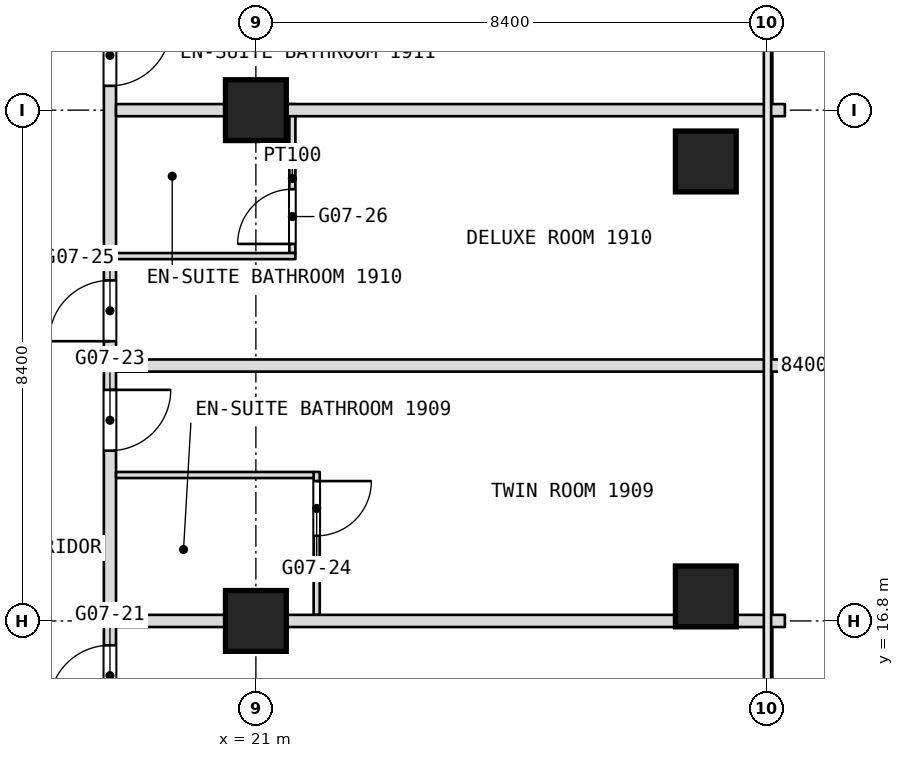
"""IFC4 building model, lengths in metres.
Left out: names, types, materials, properties, quantities, classifications, styles, units other than length and angle.
Written with IfcOpenShell. Run it as: python <this file> out.ifc"""

import sys

from ifc_helpers import new_model, si_unit, direction, frame, frame_2d, origin, origin_2d, place, context, subcontext, project, spatial, rectangle, extrude, element, fill, save


model = new_model("IFC4")
c1 = context("Model", 3, precision=1e-05, world=origin(), true_north=direction((0.0, 1.0)))
c2 = subcontext(c1, "Body", "Model", "MODEL_VIEW")
j1 = project(units=[si_unit("LENGTHUNIT", "METRE"), si_unit("PLANEANGLEUNIT", "RADIAN")], contexts=[c1])
p1 = place(None, origin())
s1 = spatial("IfcSite", under=j1, at=p1, CompositionType="ELEMENT")
p2 = place(p1, origin())
s2 = spatial("IfcBuilding", under=s1, at=p2, CompositionType="ELEMENT")
p3 = place(p2, frame((0.0, 0.0, 83.3)))
s3 = spatial("IfcBuildingStorey", under=s2, at=p3, CompositionType="ELEMENT", Elevation=83.3)
for number, where, z_axis, x_axis in (
    (1, (21.0, 16.8, 0.0), (0.0, 0.0, 1.0), (1.0, 0.0, 0.0)),
    (2, (21.0, 25.2, 0.0), (0.0, 0.0, 1.0), (1.0, 0.0, 0.0)),
    (3, (28.4, 24.356, 0.0), (0.0, 0.0, 1.0), (1.0, 0.0, 0.0)),
    (4, (28.4, 17.203, 0.0), (0.0, 0.0, 1.0), (1.0, 0.0, 0.0)),
):
    element("IfcColumn", number, at=place(p3, frame(where, z_axis=z_axis, x_axis=x_axis)), inside=s3, PredefinedType="COLUMN", context=c2, shape_type="SweptSolid", body=[
        extrude(rectangle(XDim=1.0, YDim=1.0, at=origin_2d()), origin(), (0.0, 0.0, 1.0), 3.6),
    ])
p4 = place(p3, frame((22.0, 16.9, 0.0), z_axis=(0.0, 0.0, 1.0), x_axis=(0.0, 1.0, 0.0)))
e5 = element("IfcWall", 5, at=p4, inside=s3, PredefinedType="PARTITIONING", context=c2, shape_type="SweptSolid", body=[
    extrude(rectangle(XDim=2.35, YDim=0.1, at=frame_2d((1.175, 0.0))), origin(), (0.0, 0.0, 1.0), 3.3),
])
p5 = place(p4, frame((1.3, 0.0, 0.0)))
e6 = element("IfcOpeningElement", 6, at=p5, cuts=e5, PredefinedType="OPENING", context=c2, shape_type="SweptSolid", body=[
    extrude(rectangle(XDim=0.9, YDim=2.1, at=frame_2d((0.45, 1.05))), frame((0.0, 0.05, 0.0), z_axis=(0.0, -1.0, 0.0), x_axis=(1.0, 0.0, 0.0)), (0.0, 0.0, 1.0), 0.1),
])
p6 = place(p3, frame((21.6, 22.85, 0.0), z_axis=(0.0, 0.0, 1.0), x_axis=(0.0, 1.0, 0.0)))
e7 = element("IfcWall", 7, at=p6, inside=s3, PredefinedType="PARTITIONING", context=c2, shape_type="SweptSolid", body=[
    extrude(rectangle(XDim=2.45, YDim=0.1, at=frame_2d((1.225, 0.0))), origin(), (0.0, 0.0, 1.0), 3.3),
])
p7 = place(p6, frame((0.15, 0.0, 0.0)))
e8 = element("IfcOpeningElement", 8, at=p7, cuts=e7, PredefinedType="OPENING", context=c2, shape_type="SweptSolid", body=[
    extrude(rectangle(XDim=0.9, YDim=2.1, at=frame_2d((0.45, 1.05))), frame((0.0, 0.05, 0.0), z_axis=(0.0, -1.0, 0.0), x_axis=(1.0, 0.0, 0.0)), (0.0, 0.0, 1.0), 0.1),
])
p8 = place(p3, frame((18.6, -16.665, 0.0), z_axis=(0.0, 0.0, 1.0), x_axis=(0.0, 1.0, 0.0)))
e9 = element("IfcWall", 9, at=p8, inside=s3, PredefinedType="PARTITIONING", context=c2, shape_type="SweptSolid", body=[
    extrude(rectangle(XDim=50.205, YDim=0.2, at=frame_2d((25.103, 0.0))), origin(), (0.0, 0.0, 1.0), 3.3),
])
p9 = place(p8, frame((2.991, 0.0, 0.0)))
e10 = element("IfcOpeningElement", 10, at=p9, cuts=e9, PredefinedType="OPENING", context=c2, shape_type="SweptSolid", body=[
    extrude(rectangle(XDim=1.0, YDim=2.1, at=frame_2d((0.5, 1.05))), frame((0.0, 0.1, 0.0), z_axis=(0.0, -1.0, 0.0), x_axis=(1.0, 0.0, 0.0)), (0.0, 0.0, 1.0), 0.2),
])
p10 = place(p8, frame((4.574, 0.0, 0.0)))
e11 = element("IfcOpeningElement", 11, at=p10, cuts=e9, PredefinedType="OPENING", context=c2, shape_type="SweptSolid", body=[
    extrude(rectangle(XDim=1.0, YDim=2.1, at=frame_2d((0.5, 1.05))), frame((0.0, 0.1, 0.0), z_axis=(0.0, -1.0, 0.0), x_axis=(1.0, 0.0, 0.0)), (0.0, 0.0, 1.0), 0.2),
])
p11 = place(p8, frame((8.665, 0.0, 0.0)))
e12 = element("IfcOpeningElement", 12, at=p11, cuts=e9, PredefinedType="OPENING", context=c2, shape_type="SweptSolid", body=[
    extrude(rectangle(XDim=1.0, YDim=2.1, at=frame_2d((0.5, 1.05))), frame((0.0, 0.1, 0.0), z_axis=(0.0, -1.0, 0.0), x_axis=(1.0, 0.0, 0.0)), (0.0, 0.0, 1.0), 0.2),
])
p12 = place(p8, frame((15.265, 0.0, 0.0)))
e13 = element("IfcOpeningElement", 13, at=p12, cuts=e9, PredefinedType="OPENING", context=c2, shape_type="SweptSolid", body=[
    extrude(rectangle(XDim=1.0, YDim=2.1, at=frame_2d((0.5, 1.05))), frame((0.0, 0.1, 0.0), z_axis=(0.0, -1.0, 0.0), x_axis=(1.0, 0.0, 0.0)), (0.0, 0.0, 1.0), 0.2),
])
p13 = place(p8, frame((19.465, 0.0, 0.0)))
e14 = element("IfcOpeningElement", 14, at=p13, cuts=e9, PredefinedType="OPENING", context=c2, shape_type="SweptSolid", body=[
    extrude(rectangle(XDim=1.0, YDim=2.1, at=frame_2d((0.5, 1.05))), frame((0.0, 0.1, 0.0), z_axis=(0.0, -1.0, 0.0), x_axis=(1.0, 0.0, 0.0)), (0.0, 0.0, 1.0), 0.2),
])
p14 = place(p8, frame((21.265, 0.0, 0.0)))
e15 = element("IfcOpeningElement", 15, at=p14, cuts=e9, PredefinedType="OPENING", context=c2, shape_type="SweptSolid", body=[
    extrude(rectangle(XDim=1.0, YDim=2.1, at=frame_2d((0.5, 1.05))), frame((0.0, 0.1, 0.0), z_axis=(0.0, -1.0, 0.0), x_axis=(1.0, 0.0, 0.0)), (0.0, 0.0, 1.0), 0.2),
])
p15 = place(p8, frame((25.465, 0.0, 0.0)))
e16 = element("IfcOpeningElement", 16, at=p15, cuts=e9, PredefinedType="OPENING", context=c2, shape_type="SweptSolid", body=[
    extrude(rectangle(XDim=1.0, YDim=2.1, at=frame_2d((0.5, 1.05))), frame((0.0, 0.1, 0.0), z_axis=(0.0, -1.0, 0.0), x_axis=(1.0, 0.0, 0.0)), (0.0, 0.0, 1.0), 0.2),
])
p16 = place(p8, frame((32.065, 0.0, 0.0)))
e17 = element("IfcOpeningElement", 17, at=p16, cuts=e9, PredefinedType="OPENING", context=c2, shape_type="SweptSolid", body=[
    extrude(rectangle(XDim=1.0, YDim=2.1, at=frame_2d((0.5, 1.05))), frame((0.0, 0.1, 0.0), z_axis=(0.0, -1.0, 0.0), x_axis=(1.0, 0.0, 0.0)), (0.0, 0.0, 1.0), 0.2),
])
p17 = place(p8, frame((36.265, 0.0, 0.0)))
e18 = element("IfcOpeningElement", 18, at=p17, cuts=e9, PredefinedType="OPENING", context=c2, shape_type="SweptSolid", body=[
    extrude(rectangle(XDim=1.0, YDim=2.1, at=frame_2d((0.5, 1.05))), frame((0.0, 0.1, 0.0), z_axis=(0.0, -1.0, 0.0), x_axis=(1.0, 0.0, 0.0)), (0.0, 0.0, 1.0), 0.2),
])
p18 = place(p8, frame((38.065, 0.0, 0.0)))
e19 = element("IfcOpeningElement", 19, at=p18, cuts=e9, PredefinedType="OPENING", context=c2, shape_type="SweptSolid", body=[
    extrude(rectangle(XDim=1.0, YDim=2.1, at=frame_2d((0.5, 1.05))), frame((0.0, 0.1, 0.0), z_axis=(0.0, -1.0, 0.0), x_axis=(1.0, 0.0, 0.0)), (0.0, 0.0, 1.0), 0.2),
])
p19 = place(p8, frame((42.265, 0.0, 0.0)))
e20 = element("IfcOpeningElement", 20, at=p19, cuts=e9, PredefinedType="OPENING", context=c2, shape_type="SweptSolid", body=[
    extrude(rectangle(XDim=1.0, YDim=2.1, at=frame_2d((0.5, 1.05))), frame((0.0, 0.1, 0.0), z_axis=(0.0, -1.0, 0.0), x_axis=(1.0, 0.0, 0.0)), (0.0, 0.0, 1.0), 0.2),
])
p20 = place(p8, frame((46.365, 0.0, 0.0)))
e21 = element("IfcOpeningElement", 21, at=p20, cuts=e9, PredefinedType="OPENING", context=c2, shape_type="SweptSolid", body=[
    extrude(rectangle(XDim=1.0, YDim=2.1, at=frame_2d((0.5, 1.05))), frame((0.0, 0.1, 0.0), z_axis=(0.0, -1.0, 0.0), x_axis=(1.0, 0.0, 0.0)), (0.0, 0.0, 1.0), 0.2),
])
p21 = place(p3, frame((18.7, 16.8, 0.0), z_axis=(0.0, 0.0, 1.0), x_axis=(1.0, 0.0, 0.0)))
e22 = element("IfcWall", 22, at=p21, inside=s3, PredefinedType="PARTITIONING", context=c2, shape_type="SweptSolid", body=[
    extrude(rectangle(XDim=11.0, YDim=0.2, at=frame_2d((5.5, 0.0))), origin(), (0.0, 0.0, 1.0), 2.8),
])
p22 = place(p3, frame((18.7, 19.2, 0.0), z_axis=(0.0, 0.0, 1.0), x_axis=(1.0, 0.0, 0.0)))
e23 = element("IfcWall", 23, at=p22, inside=s3, PredefinedType="PARTITIONING", context=c2, shape_type="SweptSolid", body=[
    extrude(rectangle(XDim=3.25, YDim=0.1, at=frame_2d((1.625, 0.0))), origin(), (0.0, 0.0, 1.0), 3.3),
])
p23 = place(p3, frame((18.7, 21.0, 0.0), z_axis=(0.0, 0.0, 1.0), x_axis=(1.0, 0.0, 0.0)))
e24 = element("IfcWall", 24, at=p23, inside=s3, PredefinedType="PARTITIONING", context=c2, shape_type="SweptSolid", body=[
    extrude(rectangle(XDim=11.0, YDim=0.2, at=frame_2d((5.5, 0.0))), origin(), (0.0, 0.0, 1.0), 3.3),
])
p24 = place(p3, frame((18.7, 22.8, 0.0), z_axis=(0.0, 0.0, 1.0), x_axis=(1.0, 0.0, 0.0)))
e25 = element("IfcWall", 25, at=p24, inside=s3, PredefinedType="PARTITIONING", context=c2, shape_type="SweptSolid", body=[
    extrude(rectangle(XDim=2.95, YDim=0.1, at=frame_2d((1.475, 0.0))), origin(), (0.0, 0.0, 1.0), 3.3),
])
p25 = place(p3, frame((18.7, 25.2, 0.0), z_axis=(0.0, 0.0, 1.0), x_axis=(1.0, 0.0, 0.0)))
e26 = element("IfcWall", 26, at=p25, inside=s3, PredefinedType="PARTITIONING", context=c2, shape_type="SweptSolid", body=[
    extrude(rectangle(XDim=11.0, YDim=0.2, at=frame_2d((5.5, 0.0))), origin(), (0.0, 0.0, 1.0), 2.8),
])
p26 = place(p5, origin())
e27 = element("IfcDoor", 27, at=p26, inside=s3, OperationType="SINGLE_SWING_RIGHT", PredefinedType="DOOR", context=c2, shape_type="SweptSolid", body=[
    extrude(rectangle(XDim=0.9, YDim=2.1, at=frame_2d((0.45, 1.05))), frame((0.0, 0.025, 0.0), z_axis=(0.0, -1.0, 0.0), x_axis=(1.0, 0.0, 0.0)), (0.0, 0.0, 1.0), 0.05),
])
fill(e6, e27)
p27 = place(p7, origin())
e28 = element("IfcDoor", 28, at=p27, inside=s3, OperationType="SINGLE_SWING_LEFT", PredefinedType="DOOR", context=c2, shape_type="SweptSolid", body=[
    extrude(rectangle(XDim=0.9, YDim=2.1, at=frame_2d((0.45, 1.05))), frame((0.0, 0.025, 0.0), z_axis=(0.0, -1.0, 0.0), x_axis=(1.0, 0.0, 0.0)), (0.0, 0.0, 1.0), 0.05),
])
fill(e8, e28)
p28 = place(p16, origin())
e29 = element("IfcDoor", 29, at=p28, inside=s3, OperationType="SINGLE_SWING_LEFT", PredefinedType="DOOR", context=c2, shape_type="SweptSolid", body=[
    extrude(rectangle(XDim=1.0, YDim=2.1, at=frame_2d((0.5, 1.05))), frame((0.0, 0.025, 0.0), z_axis=(0.0, -1.0, 0.0), x_axis=(1.0, 0.0, 0.0)), (0.0, 0.0, 1.0), 0.05),
])
fill(e17, e29)
p29 = place(p17, origin())
e30 = element("IfcDoor", 30, at=p29, inside=s3, OperationType="SINGLE_SWING_LEFT", PredefinedType="DOOR", context=c2, shape_type="SweptSolid", body=[
    extrude(rectangle(XDim=1.0, YDim=2.1, at=frame_2d((0.5, 1.05))), frame((0.0, 0.025, 0.0), z_axis=(0.0, -1.0, 0.0), x_axis=(1.0, 0.0, 0.0)), (0.0, 0.0, 1.0), 0.05),
])
fill(e18, e30)
p30 = place(p18, origin())
e31 = element("IfcDoor", 31, at=p30, inside=s3, OperationType="SINGLE_SWING_LEFT", PredefinedType="DOOR", context=c2, shape_type="SweptSolid", body=[
    extrude(rectangle(XDim=1.0, YDim=2.1, at=frame_2d((0.5, 1.05))), frame((0.0, 0.025, 0.0), z_axis=(0.0, -1.0, 0.0), x_axis=(1.0, 0.0, 0.0)), (0.0, 0.0, 1.0), 0.05),
])
fill(e19, e31)
p31 = place(p19, origin())
e32 = element("IfcDoor", 32, at=p31, inside=s3, OperationType="SINGLE_SWING_LEFT", PredefinedType="DOOR", context=c2, shape_type="SweptSolid", body=[
    extrude(rectangle(XDim=1.0, YDim=2.1, at=frame_2d((0.5, 1.05))), frame((0.0, 0.025, 0.0), z_axis=(0.0, -1.0, 0.0), x_axis=(1.0, 0.0, 0.0)), (0.0, 0.0, 1.0), 0.05),
])
fill(e20, e32)
save(model, sys.argv[1])
